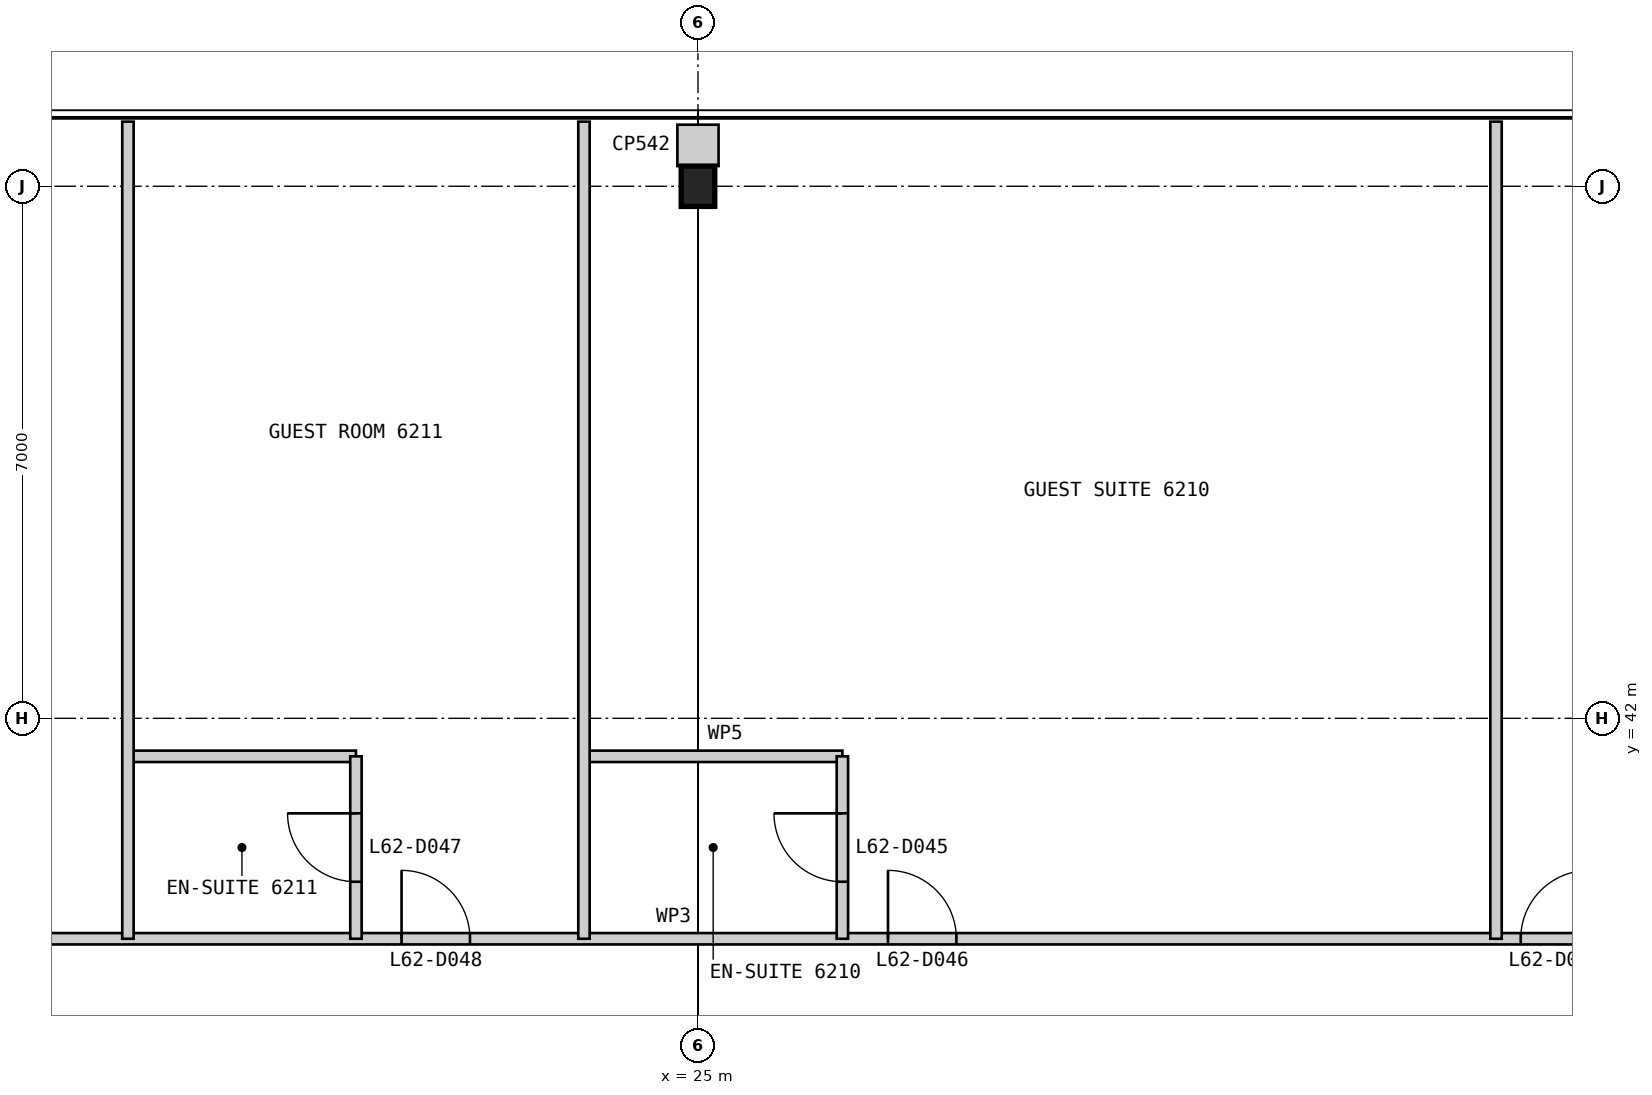
"""IFC4 building model, lengths in metres.
Left out: names, types, materials, properties, quantities, classifications, styles, units other than length and angle.
Written with IfcOpenShell. Run it as: python <this file> out.ifc"""

import sys

from ifc_helpers import new_model, si_unit, direction, frame, frame_2d, origin, origin_2d, place, context, subcontext, project, spatial, rectangle, i_section, extrude, element, fill, save


model = new_model("IFC4")
c1 = context("Model", 3, precision=1e-05, world=origin(), true_north=direction((0.0, 1.0)))
c2 = subcontext(c1, "Body", "Model", "MODEL_VIEW")
j1 = project(units=[si_unit("LENGTHUNIT", "METRE"), si_unit("PLANEANGLEUNIT", "RADIAN")], contexts=[c1])
p1 = place(None, origin())
s1 = spatial("IfcSite", under=j1, at=p1, CompositionType="ELEMENT")
p2 = place(p1, origin())
s2 = spatial("IfcBuilding", under=s1, at=p2, CompositionType="ELEMENT")
p3 = place(p2, frame((0.0, 0.0, 262.8)))
s3 = spatial("IfcBuildingStorey", under=s2, at=p3, CompositionType="ELEMENT", Elevation=262.8)
p4 = place(p3, frame((25.0, 49.0, 0.0), z_axis=(0.0, 0.0, 1.0), x_axis=(1.0, 0.0, 0.0)))
e1 = element("IfcColumn", 1, at=p4, inside=s3, PredefinedType="COLUMN", context=c2, shape_type="SweptSolid", body=[
    extrude(i_section(OverallWidth=0.442, OverallDepth=0.531, WebThickness=0.066, FlangeThickness=0.106, at=origin_2d()), origin(), (0.0, 0.0, 1.0), 3.4),
])
p5 = place(p3, frame((39.1, 39.1, 0.0), z_axis=(0.0, 0.0, 1.0), x_axis=(-1.0, 0.0, 0.0)))
e2 = element("IfcWall", 2, at=p5, inside=s3, PredefinedType="PARTITIONING", context=c2, shape_type="SweptSolid", body=[
    extrude(rectangle(XDim=28.2, YDim=0.15, at=frame_2d((14.1, 0.0))), origin(), (0.0, 0.0, 1.0), 3.25),
])
p6 = place(p5, frame((2.375, 0.0, 0.0)))
e3 = element("IfcOpeningElement", 3, at=p6, cuts=e2, PredefinedType="OPENING", context=c2, shape_type="SweptSolid", body=[
    extrude(rectangle(XDim=0.9, YDim=2.1, at=frame_2d((0.45, 1.05))), frame((0.0, 0.085, 0.0), z_axis=(0.0, -1.0, 0.0), x_axis=(1.0, 0.0, 0.0)), (0.0, 0.0, 1.0), 0.17),
])
p7 = place(p5, frame((10.7, 0.0, 0.0)))
e4 = element("IfcOpeningElement", 4, at=p7, cuts=e2, PredefinedType="OPENING", context=c2, shape_type="SweptSolid", body=[
    extrude(rectangle(XDim=0.9, YDim=2.1, at=frame_2d((0.45, 1.05))), frame((0.0, 0.085, 0.0), z_axis=(0.0, -1.0, 0.0), x_axis=(1.0, 0.0, 0.0)), (0.0, 0.0, 1.0), 0.17),
])
p8 = place(p5, frame((17.1, 0.0, 0.0)))
e5 = element("IfcOpeningElement", 5, at=p8, cuts=e2, PredefinedType="OPENING", context=c2, shape_type="SweptSolid", body=[
    extrude(rectangle(XDim=0.9, YDim=2.1, at=frame_2d((0.45, 1.05))), frame((0.0, 0.085, 0.0), z_axis=(0.0, -1.0, 0.0), x_axis=(1.0, 0.0, 0.0)), (0.0, 0.0, 1.0), 0.17),
])
p9 = place(p5, frame((23.4, 0.0, 0.0)))
e6 = element("IfcOpeningElement", 6, at=p9, cuts=e2, PredefinedType="OPENING", context=c2, shape_type="SweptSolid", body=[
    extrude(rectangle(XDim=1.0, YDim=2.1, at=frame_2d((0.5, 1.05))), frame((0.0, 0.085, 0.0), z_axis=(0.0, -1.0, 0.0), x_axis=(1.0, 0.0, 0.0)), (0.0, 0.0, 1.0), 0.17),
])
p10 = place(p3, frame((35.5, 49.85, 0.0), z_axis=(0.0, 0.0, 1.0), x_axis=(0.0, -1.0, 0.0)))
e7 = element("IfcWall", 7, at=p10, inside=s3, PredefinedType="PARTITIONING", context=c2, shape_type="SweptSolid", body=[
    extrude(rectangle(XDim=10.75, YDim=0.15, at=frame_2d((5.375, 0.0))), origin(), (0.0, 0.0, 1.0), 3.25),
])
p11 = place(p3, frame((26.9, 41.5, 0.0), z_axis=(0.0, 0.0, 1.0), x_axis=(-1.0, 0.0, 0.0)))
e8 = element("IfcWall", 8, at=p11, inside=s3, PredefinedType="PARTITIONING", context=c2, shape_type="SweptSolid", body=[
    extrude(rectangle(XDim=3.4, YDim=0.15, at=frame_2d((1.7, 0.0))), origin(), (0.0, 0.0, 1.0), 3.25),
])
p12 = place(p3, frame((26.9, 41.5, 0.0), z_axis=(0.0, 0.0, 1.0), x_axis=(0.0, -1.0, 0.0)))
e9 = element("IfcWall", 9, at=p12, inside=s3, PredefinedType="PARTITIONING", context=c2, shape_type="SweptSolid", body=[
    extrude(rectangle(XDim=2.4, YDim=0.15, at=frame_2d((1.2, 0.0))), origin(), (0.0, 0.0, 1.0), 3.25),
])
p13 = place(p12, frame((0.75, 0.0, 0.0)))
e10 = element("IfcOpeningElement", 10, at=p13, cuts=e9, PredefinedType="OPENING", context=c2, shape_type="SweptSolid", body=[
    extrude(rectangle(XDim=0.9, YDim=2.1, at=frame_2d((0.45, 1.05))), frame((0.0, 0.085, 0.0), z_axis=(0.0, -1.0, 0.0), x_axis=(1.0, 0.0, 0.0)), (0.0, 0.0, 1.0), 0.17),
])
p14 = place(p3, frame((23.5, 49.85, 0.0), z_axis=(0.0, 0.0, 1.0), x_axis=(0.0, -1.0, 0.0)))
e11 = element("IfcWall", 11, at=p14, inside=s3, PredefinedType="PARTITIONING", context=c2, shape_type="SweptSolid", body=[
    extrude(rectangle(XDim=10.75, YDim=0.15, at=frame_2d((5.375, 0.0))), origin(), (0.0, 0.0, 1.0), 3.25),
])
p15 = place(p3, frame((20.5, 41.5, 0.0), z_axis=(0.0, 0.0, 1.0), x_axis=(-1.0, 0.0, 0.0)))
e12 = element("IfcWall", 12, at=p15, inside=s3, PredefinedType="PARTITIONING", context=c2, shape_type="SweptSolid", body=[
    extrude(rectangle(XDim=3.0, YDim=0.15, at=frame_2d((1.5, 0.0))), origin(), (0.0, 0.0, 1.0), 3.25),
])
p16 = place(p3, frame((20.5, 41.5, 0.0), z_axis=(0.0, 0.0, 1.0), x_axis=(0.0, -1.0, 0.0)))
e13 = element("IfcWall", 13, at=p16, inside=s3, PredefinedType="PARTITIONING", context=c2, shape_type="SweptSolid", body=[
    extrude(rectangle(XDim=2.4, YDim=0.15, at=frame_2d((1.2, 0.0))), origin(), (0.0, 0.0, 1.0), 3.25),
])
p17 = place(p16, frame((0.75, 0.0, 0.0)))
e14 = element("IfcOpeningElement", 14, at=p17, cuts=e13, PredefinedType="OPENING", context=c2, shape_type="SweptSolid", body=[
    extrude(rectangle(XDim=0.9, YDim=2.1, at=frame_2d((0.45, 1.05))), frame((0.0, 0.085, 0.0), z_axis=(0.0, -1.0, 0.0), x_axis=(1.0, 0.0, 0.0)), (0.0, 0.0, 1.0), 0.17),
])
p18 = place(p3, frame((17.5, 49.85, 0.0), z_axis=(0.0, 0.0, 1.0), x_axis=(0.0, -1.0, 0.0)))
e15 = element("IfcWall", 15, at=p18, inside=s3, PredefinedType="PARTITIONING", context=c2, shape_type="SweptSolid", body=[
    extrude(rectangle(XDim=10.75, YDim=0.15, at=frame_2d((5.375, 0.0))), origin(), (0.0, 0.0, 1.0), 3.25),
])
p19 = place(p3, frame((25.0, 49.81, 0.0), z_axis=(0.0, 0.0, 1.0), x_axis=(0.0, -1.0, 0.0)))
e16 = element("IfcWall", 16, at=p19, inside=s3, PredefinedType="PARTITIONING", context=c2, shape_type="SweptSolid", body=[
    extrude(rectangle(XDim=0.545, YDim=0.542, at=frame_2d((0.272, 0.0))), origin(), (0.0, 0.0, 1.0), 3.25),
])
p20 = place(p6, frame((0.9, 0.0, 0.0), z_axis=(0.0, 0.0, 1.0), x_axis=(-1.0, 0.0, 0.0)))
e17 = element("IfcDoor", 17, at=p20, inside=s3, OperationType="SINGLE_SWING_RIGHT", PredefinedType="DOOR", context=c2, shape_type="SweptSolid", body=[
    extrude(rectangle(XDim=0.9, YDim=2.1, at=frame_2d((0.45, 1.05))), frame((0.0, 0.025, 0.0), z_axis=(0.0, -1.0, 0.0), x_axis=(1.0, 0.0, 0.0)), (0.0, 0.0, 1.0), 0.05),
])
fill(e3, e17)
p21 = place(p13, frame((0.9, 0.0, 0.0), z_axis=(0.0, 0.0, 1.0), x_axis=(-1.0, 0.0, 0.0)))
e18 = element("IfcDoor", 18, at=p21, inside=s3, OperationType="SINGLE_SWING_RIGHT", PredefinedType="DOOR", context=c2, shape_type="SweptSolid", body=[
    extrude(rectangle(XDim=0.9, YDim=2.1, at=frame_2d((0.45, 1.05))), frame((0.0, 0.025, 0.0), z_axis=(0.0, -1.0, 0.0), x_axis=(1.0, 0.0, 0.0)), (0.0, 0.0, 1.0), 0.05),
])
fill(e10, e18)
p22 = place(p7, frame((0.9, 0.0, 0.0), z_axis=(0.0, 0.0, 1.0), x_axis=(-1.0, 0.0, 0.0)))
e19 = element("IfcDoor", 19, at=p22, inside=s3, OperationType="SINGLE_SWING_LEFT", PredefinedType="DOOR", context=c2, shape_type="SweptSolid", body=[
    extrude(rectangle(XDim=0.9, YDim=2.1, at=frame_2d((0.45, 1.05))), frame((0.0, 0.025, 0.0), z_axis=(0.0, -1.0, 0.0), x_axis=(1.0, 0.0, 0.0)), (0.0, 0.0, 1.0), 0.05),
])
fill(e4, e19)
p23 = place(p17, frame((0.9, 0.0, 0.0), z_axis=(0.0, 0.0, 1.0), x_axis=(-1.0, 0.0, 0.0)))
e20 = element("IfcDoor", 20, at=p23, inside=s3, OperationType="SINGLE_SWING_RIGHT", PredefinedType="DOOR", context=c2, shape_type="SweptSolid", body=[
    extrude(rectangle(XDim=0.9, YDim=2.1, at=frame_2d((0.45, 1.05))), frame((0.0, 0.025, 0.0), z_axis=(0.0, -1.0, 0.0), x_axis=(1.0, 0.0, 0.0)), (0.0, 0.0, 1.0), 0.05),
])
fill(e14, e20)
p24 = place(p8, frame((0.9, 0.0, 0.0), z_axis=(0.0, 0.0, 1.0), x_axis=(-1.0, 0.0, 0.0)))
e21 = element("IfcDoor", 21, at=p24, inside=s3, OperationType="SINGLE_SWING_LEFT", PredefinedType="DOOR", context=c2, shape_type="SweptSolid", body=[
    extrude(rectangle(XDim=0.9, YDim=2.1, at=frame_2d((0.45, 1.05))), frame((0.0, 0.025, 0.0), z_axis=(0.0, -1.0, 0.0), x_axis=(1.0, 0.0, 0.0)), (0.0, 0.0, 1.0), 0.05),
])
fill(e5, e21)
save(model, sys.argv[1])
